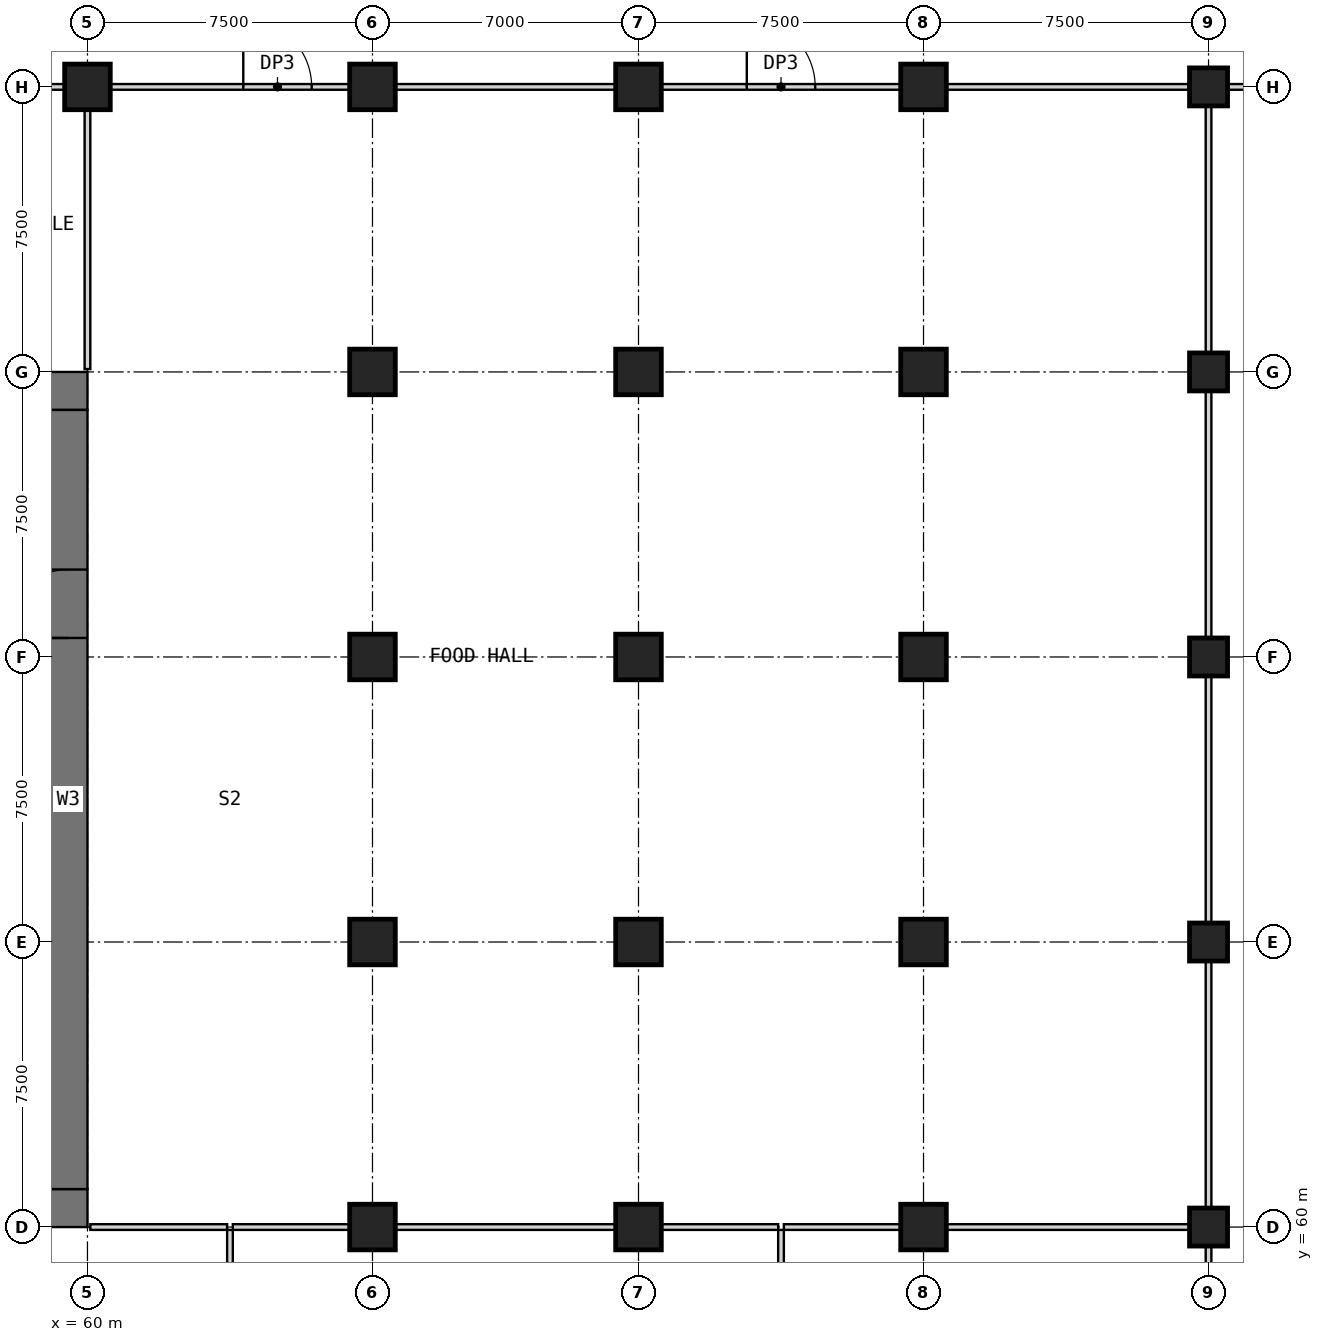
"""IFC4 building model, lengths in metres.
Left out: names, types, materials, properties, quantities, classifications, styles, units other than length and angle.
Written with IfcOpenShell. Run it as: python <this file> out.ifc"""

import sys

from ifc_helpers import new_model, si_unit, direction, frame, frame_2d, origin, origin_2d, place, context, subcontext, project, spatial, rectangle, extrude, element, fill, save


model = new_model("IFC4")
c1 = context("Model", 3, precision=1e-05, world=origin(), true_north=direction((0.0, 1.0)))
c2 = subcontext(c1, "Body", "Model", "MODEL_VIEW")
j1 = project(units=[si_unit("LENGTHUNIT", "METRE"), si_unit("PLANEANGLEUNIT", "RADIAN")], contexts=[c1])
p1 = place(None, origin())
s1 = spatial("IfcSite", under=j1, at=p1, CompositionType="ELEMENT")
p2 = place(p1, origin())
s2 = spatial("IfcBuilding", under=s1, at=p2, CompositionType="ELEMENT")
p3 = place(p2, frame((0.0, 0.0, 18.5)))
s3 = spatial("IfcBuildingStorey", under=s2, at=p3, CompositionType="ELEMENT", Elevation=18.5)
for number, where, z_axis, x_axis in (
    (1, (60.0, 90.0, 0.0), (0.0, 0.0, 1.0), (1.0, 0.0, 0.0)),
    (2, (67.5, 60.0, 0.0), (0.0, 0.0, 1.0), (1.0, 0.0, 0.0)),
    (3, (67.5, 67.5, 0.0), (0.0, 0.0, 1.0), (1.0, 0.0, 0.0)),
    (4, (67.5, 75.0, 0.0), (0.0, 0.0, 1.0), (1.0, 0.0, 0.0)),
    (5, (67.5, 82.5, 0.0), (0.0, 0.0, 1.0), (1.0, 0.0, 0.0)),
    (6, (67.5, 90.0, 0.0), (0.0, 0.0, 1.0), (1.0, 0.0, 0.0)),
    (7, (74.5, 60.0, 0.0), (0.0, 0.0, 1.0), (1.0, 0.0, 0.0)),
    (8, (74.5, 67.5, 0.0), (0.0, 0.0, 1.0), (1.0, 0.0, 0.0)),
    (9, (74.5, 75.0, 0.0), (0.0, 0.0, 1.0), (1.0, 0.0, 0.0)),
    (10, (74.5, 82.5, 0.0), (0.0, 0.0, 1.0), (1.0, 0.0, 0.0)),
    (11, (74.5, 90.0, 0.0), (0.0, 0.0, 1.0), (1.0, 0.0, 0.0)),
    (12, (82.0, 60.0, 0.0), (0.0, 0.0, 1.0), (1.0, 0.0, 0.0)),
    (13, (82.0, 67.5, 0.0), (0.0, 0.0, 1.0), (1.0, 0.0, 0.0)),
    (14, (82.0, 75.0, 0.0), (0.0, 0.0, 1.0), (1.0, 0.0, 0.0)),
    (15, (82.0, 82.5, 0.0), (0.0, 0.0, 1.0), (1.0, 0.0, 0.0)),
    (16, (82.0, 90.0, 0.0), (0.0, 0.0, 1.0), (1.0, 0.0, 0.0)),
):
    element("IfcColumn", number, at=place(p3, frame(where, z_axis=z_axis, x_axis=x_axis)), inside=s3, PredefinedType="COLUMN", context=c2, shape_type="SweptSolid", body=[
        extrude(rectangle(XDim=1.2, YDim=1.2, at=origin_2d()), origin(), (0.0, 0.0, 1.0), 5.0),
    ])
for number, where, z_axis, x_axis in (
    (17, (89.5, 60.0, 0.0), (0.0, 0.0, 1.0), (1.0, 0.0, 0.0)),
    (18, (89.5, 67.5, 0.0), (0.0, 0.0, 1.0), (1.0, 0.0, 0.0)),
    (19, (89.5, 75.0, 0.0), (0.0, 0.0, 1.0), (1.0, 0.0, 0.0)),
    (20, (89.5, 82.5, 0.0), (0.0, 0.0, 1.0), (1.0, 0.0, 0.0)),
    (21, (89.5, 90.0, 0.0), (0.0, 0.0, 1.0), (1.0, 0.0, 0.0)),
):
    element("IfcColumn", number, at=place(p3, frame(where, z_axis=z_axis, x_axis=x_axis)), inside=s3, PredefinedType="COLUMN", context=c2, shape_type="SweptSolid", body=[
        extrude(rectangle(XDim=1.0, YDim=1.0, at=origin_2d()), origin(), (0.0, 0.0, 1.0), 5.0),
    ])
p4 = place(p3, frame((30.0, 60.5, 0.0), z_axis=(0.0, 0.0, 1.0), x_axis=(1.0, 0.0, 0.0)))
e22 = element("IfcWall", 22, at=p4, inside=s3, PredefinedType="SHEAR", context=c2, shape_type="SweptSolid", body=[
    extrude(rectangle(XDim=30.0, YDim=1.0, at=frame_2d((15.0, 0.0))), origin(), (0.0, 0.0, 1.0), 5.0),
])
p5 = place(p4, frame((21.9, 0.0, 0.0)))
e23 = element("IfcOpeningElement", 23, at=p5, cuts=e22, PredefinedType="OPENING", context=c2, shape_type="SweptSolid", body=[
    extrude(rectangle(XDim=1.8, YDim=2.1, at=frame_2d((0.9, 1.05))), frame((0.0, 0.51, 0.0), z_axis=(0.0, -1.0, 0.0), x_axis=(1.0, 0.0, 0.0)), (0.0, 0.0, 1.0), 1.02),
])
p6 = place(p4, frame((26.5, 0.0, 0.0)))
e24 = element("IfcOpeningElement", 24, at=p6, cuts=e22, PredefinedType="OPENING", context=c2, shape_type="SweptSolid", body=[
    extrude(rectangle(XDim=1.2, YDim=2.1, at=frame_2d((0.6, 1.05))), frame((0.0, 0.51, 0.0), z_axis=(0.0, -1.0, 0.0), x_axis=(1.0, 0.0, 0.0)), (0.0, 0.0, 1.0), 1.02),
])
p7 = place(p3, frame((30.0, 82.0, 0.0), z_axis=(0.0, 0.0, 1.0), x_axis=(1.0, 0.0, 0.0)))
e25 = element("IfcWall", 25, at=p7, inside=s3, PredefinedType="SHEAR", context=c2, shape_type="SweptSolid", body=[
    extrude(rectangle(XDim=30.0, YDim=1.0, at=frame_2d((15.0, 0.0))), origin(), (0.0, 0.0, 1.0), 5.0),
])
p8 = place(p3, frame((59.5, 61.0, 0.0), z_axis=(0.0, 0.0, 1.0), x_axis=(0.0, 1.0, 0.0)))
e26 = element("IfcWall", 26, at=p8, inside=s3, PredefinedType="SHEAR", context=c2, shape_type="SweptSolid", body=[
    extrude(rectangle(XDim=20.5, YDim=1.0, at=frame_2d((10.25, 0.0))), origin(), (0.0, 0.0, 1.0), 5.0),
])
p9 = place(p8, frame((14.5, 0.0, 0.0)))
e27 = element("IfcOpeningElement", 27, at=p9, cuts=e26, PredefinedType="OPENING", context=c2, shape_type="SweptSolid", body=[
    extrude(rectangle(XDim=1.8, YDim=2.1, at=frame_2d((0.9, 1.05))), frame((0.0, 0.51, 0.0), z_axis=(0.0, -1.0, 0.0), x_axis=(1.0, 0.0, 0.0)), (0.0, 0.0, 1.0), 1.02),
])
p10 = place(p3, frame((60.075, 60.0, 0.0), z_axis=(0.0, 0.0, 1.0), x_axis=(1.0, 0.0, 0.0)))
e28 = element("IfcWall", 28, at=p10, inside=s3, PredefinedType="PARTITIONING", context=c2, shape_type="SweptSolid", body=[
    extrude(rectangle(XDim=3.6, YDim=0.15, at=frame_2d((1.8, 0.0))), origin(), (0.0, 0.0, 1.0), 4.7),
])
p11 = place(p3, frame((63.825, 60.0, 0.0), z_axis=(0.0, 0.0, 1.0), x_axis=(1.0, 0.0, 0.0)))
e29 = element("IfcWall", 29, at=p11, inside=s3, PredefinedType="PARTITIONING", context=c2, shape_type="SweptSolid", body=[
    extrude(rectangle(XDim=3.075, YDim=0.15, at=frame_2d((1.538, 0.0))), origin(), (0.0, 0.0, 1.0), 4.7),
])
p12 = place(p3, frame((68.1, 60.0, 0.0), z_axis=(0.0, 0.0, 1.0), x_axis=(1.0, 0.0, 0.0)))
e30 = element("IfcWall", 30, at=p12, inside=s3, PredefinedType="PARTITIONING", context=c2, shape_type="SweptSolid", body=[
    extrude(rectangle(XDim=5.8, YDim=0.15, at=frame_2d((2.9, 0.0))), origin(), (0.0, 0.0, 1.0), 4.7),
])
for number, where, z_axis, x_axis in (
    (31, (75.1, 60.0, 0.0), (0.0, 0.0, 1.0), (1.0, 0.0, 0.0)),
    (32, (78.325, 60.0, 0.0), (0.0, 0.0, 1.0), (1.0, 0.0, 0.0)),
):
    element("IfcWall", number, at=place(p3, frame(where, z_axis=z_axis, x_axis=x_axis)), inside=s3, PredefinedType="PARTITIONING", context=c2, shape_type="SweptSolid", body=[
        extrude(rectangle(XDim=3.075, YDim=0.15, at=frame_2d((1.538, 0.0))), origin(), (0.0, 0.0, 1.0), 4.7),
    ])
p13 = place(p3, frame((82.6, 60.0, 0.0), z_axis=(0.0, 0.0, 1.0), x_axis=(1.0, 0.0, 0.0)))
e33 = element("IfcWall", 33, at=p13, inside=s3, PredefinedType="PARTITIONING", context=c2, shape_type="SweptSolid", body=[
    extrude(rectangle(XDim=6.4, YDim=0.15, at=frame_2d((3.2, 0.0))), origin(), (0.0, 0.0, 1.0), 4.7),
])
p14 = place(p3, frame((56.325, 90.0, 0.0), z_axis=(0.0, 0.0, 1.0), x_axis=(1.0, 0.0, 0.0)))
e34 = element("IfcWall", 34, at=p14, inside=s3, PredefinedType="PARTITIONING", context=c2, shape_type="SweptSolid", body=[
    extrude(rectangle(XDim=3.075, YDim=0.15, at=frame_2d((1.538, 0.0))), origin(), (0.0, 0.0, 1.0), 4.7),
])
p15 = place(p14, frame((1.25, 0.0, 0.0)))
e35 = element("IfcOpeningElement", 35, at=p15, cuts=e34, PredefinedType="OPENING", context=c2, shape_type="SweptSolid", body=[
    extrude(rectangle(XDim=1.0, YDim=2.1, at=frame_2d((0.5, 1.05))), frame((0.0, 0.085, 0.0), z_axis=(0.0, -1.0, 0.0), x_axis=(1.0, 0.0, 0.0)), (0.0, 0.0, 1.0), 0.17),
])
p16 = place(p3, frame((60.6, 90.0, 0.0), z_axis=(0.0, 0.0, 1.0), x_axis=(1.0, 0.0, 0.0)))
e36 = element("IfcWall", 36, at=p16, inside=s3, PredefinedType="PARTITIONING", context=c2, shape_type="SweptSolid", body=[
    extrude(rectangle(XDim=6.3, YDim=0.15, at=frame_2d((3.15, 0.0))), origin(), (0.0, 0.0, 1.0), 4.7),
])
p17 = place(p16, frame((3.5, 0.0, 0.0)))
e37 = element("IfcOpeningElement", 37, at=p17, cuts=e36, PredefinedType="OPENING", context=c2, shape_type="SweptSolid", body=[
    extrude(rectangle(XDim=1.8, YDim=2.4, at=frame_2d((0.9, 1.2))), frame((0.0, 0.085, 0.0), z_axis=(0.0, -1.0, 0.0), x_axis=(1.0, 0.0, 0.0)), (0.0, 0.0, 1.0), 0.17),
])
p18 = place(p3, frame((68.1, 90.0, 0.0), z_axis=(0.0, 0.0, 1.0), x_axis=(1.0, 0.0, 0.0)))
e38 = element("IfcWall", 38, at=p18, inside=s3, PredefinedType="PARTITIONING", context=c2, shape_type="SweptSolid", body=[
    extrude(rectangle(XDim=5.8, YDim=0.15, at=frame_2d((2.9, 0.0))), origin(), (0.0, 0.0, 1.0), 4.7),
])
p19 = place(p3, frame((75.1, 90.0, 0.0), z_axis=(0.0, 0.0, 1.0), x_axis=(1.0, 0.0, 0.0)))
e39 = element("IfcWall", 39, at=p19, inside=s3, PredefinedType="PARTITIONING", context=c2, shape_type="SweptSolid", body=[
    extrude(rectangle(XDim=6.3, YDim=0.15, at=frame_2d((3.15, 0.0))), origin(), (0.0, 0.0, 1.0), 4.7),
])
p20 = place(p19, frame((2.25, 0.0, 0.0)))
e40 = element("IfcOpeningElement", 40, at=p20, cuts=e39, PredefinedType="OPENING", context=c2, shape_type="SweptSolid", body=[
    extrude(rectangle(XDim=1.8, YDim=2.4, at=frame_2d((0.9, 1.2))), frame((0.0, 0.085, 0.0), z_axis=(0.0, -1.0, 0.0), x_axis=(1.0, 0.0, 0.0)), (0.0, 0.0, 1.0), 0.17),
])
for number, where, z_axis, x_axis in (
    (41, (82.6, 90.0, 0.0), (0.0, 0.0, 1.0), (1.0, 0.0, 0.0)),
    (42, (90.0, 90.0, 0.0), (0.0, 0.0, 1.0), (1.0, 0.0, 0.0)),
):
    element("IfcWall", number, at=place(p3, frame(where, z_axis=z_axis, x_axis=x_axis)), inside=s3, PredefinedType="PARTITIONING", context=c2, shape_type="SweptSolid", body=[
        extrude(rectangle(XDim=6.4, YDim=0.15, at=frame_2d((3.2, 0.0))), origin(), (0.0, 0.0, 1.0), 4.7),
    ])
p21 = place(p3, frame((78.25, 52.575, 0.0), z_axis=(0.0, 0.0, 1.0), x_axis=(0.0, 1.0, 0.0)))
e43 = element("IfcWall", 43, at=p21, inside=s3, PredefinedType="PARTITIONING", context=c2, shape_type="SweptSolid", body=[
    extrude(rectangle(XDim=7.35, YDim=0.15, at=frame_2d((3.675, 0.0))), origin(), (0.0, 0.0, 1.0), 4.7),
])
for number, where, z_axis, x_axis in (
    (44, (89.5, 53.0, 0.0), (0.0, 0.0, 1.0), (0.0, 1.0, 0.0)),
    (45, (89.5, 60.5, 0.0), (0.0, 0.0, 1.0), (0.0, 1.0, 0.0)),
    (46, (89.5, 68.0, 0.0), (0.0, 0.0, 1.0), (0.0, 1.0, 0.0)),
    (47, (89.5, 75.5, 0.0), (0.0, 0.0, 1.0), (0.0, 1.0, 0.0)),
    (48, (89.5, 83.0, 0.0), (0.0, 0.0, 1.0), (0.0, 1.0, 0.0)),
):
    element("IfcWall", number, at=place(p3, frame(where, z_axis=z_axis, x_axis=x_axis)), inside=s3, PredefinedType="PARTITIONING", context=c2, shape_type="SweptSolid", body=[
        extrude(rectangle(XDim=6.5, YDim=0.15, at=frame_2d((3.25, 0.0))), origin(), (0.0, 0.0, 1.0), 4.7),
    ])
p22 = place(p3, frame((63.75, 52.575, 0.0), z_axis=(0.0, 0.0, 1.0), x_axis=(0.0, 1.0, 0.0)))
e49 = element("IfcWall", 49, at=p22, inside=s3, PredefinedType="PARTITIONING", context=c2, shape_type="SweptSolid", body=[
    extrude(rectangle(XDim=7.35, YDim=0.15, at=frame_2d((3.675, 0.0))), origin(), (0.0, 0.0, 1.0), 4.7),
])
p23 = place(p3, frame((60.0, 82.575, 0.0), z_axis=(0.0, 0.0, 1.0), x_axis=(0.0, 1.0, 0.0)))
e50 = element("IfcWall", 50, at=p23, inside=s3, PredefinedType="PARTITIONING", context=c2, shape_type="SweptSolid", body=[
    extrude(rectangle(XDim=6.825, YDim=0.15, at=frame_2d((3.413, 0.0))), origin(), (0.0, 0.0, 1.0), 4.7),
])
p24 = place(p9, origin())
e51 = element("IfcDoor", 51, at=p24, inside=s3, OperationType="DOUBLE_DOOR_SINGLE_SWING", PredefinedType="DOOR", context=c2, shape_type="SweptSolid", body=[
    extrude(rectangle(XDim=1.8, YDim=2.1, at=frame_2d((0.9, 1.05))), frame((0.0, 0.025, 0.0), z_axis=(0.0, -1.0, 0.0), x_axis=(1.0, 0.0, 0.0)), (0.0, 0.0, 1.0), 0.05),
])
fill(e27, e51)
p25 = place(p17, origin())
e52 = element("IfcDoor", 52, at=p25, inside=s3, OperationType="SINGLE_SWING_LEFT", PredefinedType="DOOR", context=c2, shape_type="SweptSolid", body=[
    extrude(rectangle(XDim=1.8, YDim=2.4, at=frame_2d((0.9, 1.2))), frame((0.0, 0.025, 0.0), z_axis=(0.0, -1.0, 0.0), x_axis=(1.0, 0.0, 0.0)), (0.0, 0.0, 1.0), 0.05),
])
fill(e37, e52)
p26 = place(p20, origin())
e53 = element("IfcDoor", 53, at=p26, inside=s3, OperationType="SINGLE_SWING_LEFT", PredefinedType="DOOR", context=c2, shape_type="SweptSolid", body=[
    extrude(rectangle(XDim=1.8, YDim=2.4, at=frame_2d((0.9, 1.2))), frame((0.0, 0.025, 0.0), z_axis=(0.0, -1.0, 0.0), x_axis=(1.0, 0.0, 0.0)), (0.0, 0.0, 1.0), 0.05),
])
fill(e40, e53)
save(model, sys.argv[1])
